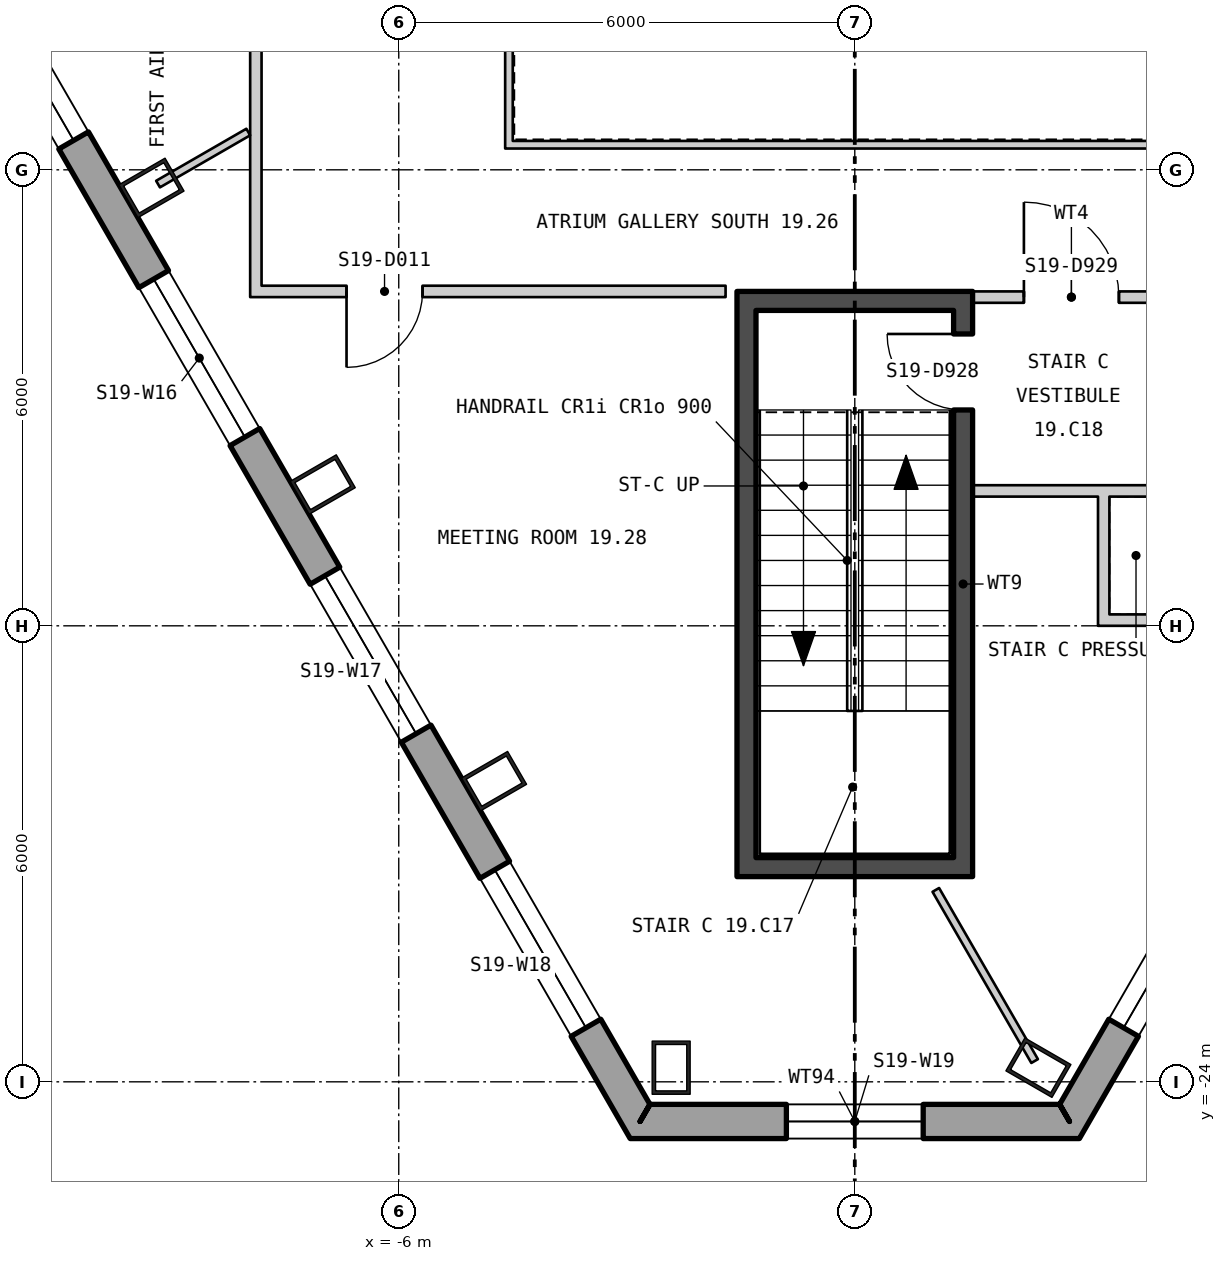
"""IFC4 building model, lengths in metres.
Left out: names, types, materials, properties, quantities, classifications, styles, units other than length and angle.
Written with IfcOpenShell. Run it as: python <this file> out.ifc"""

import sys

from ifc_helpers import new_model, si_unit, direction, frame, frame_2d, origin, origin_2d, place, context, subcontext, project, spatial, polyline, rectangle, hollow_rectangle, outline, extrude, element, fill, save


model = new_model("IFC4")
c1 = context("Model", 3, precision=1e-05, world=origin(), true_north=direction((0.0, 1.0)))
c2 = subcontext(c1, "Body", "Model", "MODEL_VIEW")
j1 = project(units=[si_unit("LENGTHUNIT", "METRE"), si_unit("PLANEANGLEUNIT", "RADIAN")], contexts=[c1])
p1 = place(None, origin())
s1 = spatial("IfcSite", under=j1, at=p1, CompositionType="ELEMENT")
p2 = place(p1, origin())
s2 = spatial("IfcBuilding", under=s1, at=p2, CompositionType="ELEMENT")
p3 = place(p2, frame((0.0, 0.0, 257.1)))
s3 = spatial("IfcBuildingStorey", under=s2, at=p3, CompositionType="ELEMENT", Elevation=257.1)
for number, where, z_axis, x_axis in (
    (1, (-9.253, -12.238, 0.0), (0.0, 0.0, 1.0), (0.5, -0.866, 0.0)),
    (2, (-7.0, -16.141, 0.0), (0.0, 0.0, 1.0), (0.5, -0.866, 0.0)),
    (3, (-4.746, -20.044, 0.0), (0.0, 0.0, 1.0), (0.5, -0.866, 0.0)),
    (4, (-2.416, -23.814, 0.0), (0.0, 0.0, 1.0), (1.0, 0.0, 0.0)),
    (5, (2.416, -23.814, 0.0), (0.0, 0.0, 1.0), (0.5, 0.866, 0.0)),
):
    element("IfcColumn", number, at=place(p3, frame(where, z_axis=z_axis, x_axis=x_axis)), inside=s3, PredefinedType="COLUMN", context=c2, shape_type="SweptSolid", body=[
        extrude(hollow_rectangle(XDim=0.5, YDim=0.7, WallThickness=0.045, at=origin_2d()), origin(), (0.0, 0.0, 1.0), 3.9),
    ])
p4 = place(p3, frame((-25.69, 15.082, -0.18), z_axis=(0.0, 0.0, 1.0), x_axis=(0.500000141277, -0.866025322218, 0.0)))
e6 = element("IfcWall", 6, at=p4, inside=s3, PredefinedType="SOLIDWALL", context=c2, shape_type="SweptSolid", body=[
    extrude(outline(polyline([(-0.13, -0.225), (45.86, -0.225), (45.6, 0.225), (0.13, 0.225), (-0.13, -0.225)])), origin(), (0.0, 0.0, 1.0), 3.68),
])
p5 = place(p4, frame((1.424, 0.0, 1.08)))
e7 = element("IfcOpeningElement", 7, at=p5, cuts=e6, PredefinedType="OPENING", context=c2, shape_type="SweptSolid", body=[
    extrude(rectangle(XDim=2.4, YDim=2.0, at=frame_2d((1.2, 1.0))), frame((0.0, 0.235, 0.0), z_axis=(0.0, -1.0, 0.0), x_axis=(1.0, 0.0, 0.0)), (0.0, 0.0, 1.0), 0.47),
])
p6 = place(p4, frame((5.892, 0.0, 1.08)))
e8 = element("IfcOpeningElement", 8, at=p6, cuts=e6, PredefinedType="OPENING", context=c2, shape_type="SweptSolid", body=[
    extrude(rectangle(XDim=2.4, YDim=2.0, at=frame_2d((1.2, 1.0))), frame((0.0, 0.235, 0.0), z_axis=(0.0, -1.0, 0.0), x_axis=(1.0, 0.0, 0.0)), (0.0, 0.0, 1.0), 0.47),
])
p7 = place(p4, frame((10.399, 0.0, 1.08)))
e9 = element("IfcOpeningElement", 9, at=p7, cuts=e6, PredefinedType="OPENING", context=c2, shape_type="SweptSolid", body=[
    extrude(rectangle(XDim=2.4, YDim=2.0, at=frame_2d((1.2, 1.0))), frame((0.0, 0.235, 0.0), z_axis=(0.0, -1.0, 0.0), x_axis=(1.0, 0.0, 0.0)), (0.0, 0.0, 1.0), 0.47),
])
p8 = place(p4, frame((14.905, 0.0, 1.08)))
e10 = element("IfcOpeningElement", 10, at=p8, cuts=e6, PredefinedType="OPENING", context=c2, shape_type="SweptSolid", body=[
    extrude(rectangle(XDim=2.4, YDim=2.0, at=frame_2d((1.2, 1.0))), frame((0.0, 0.235, 0.0), z_axis=(0.0, -1.0, 0.0), x_axis=(1.0, 0.0, 0.0)), (0.0, 0.0, 1.0), 0.47),
])
p9 = place(p4, frame((19.412, 0.0, 1.08)))
e11 = element("IfcOpeningElement", 11, at=p9, cuts=e6, PredefinedType="OPENING", context=c2, shape_type="SweptSolid", body=[
    extrude(rectangle(XDim=2.4, YDim=2.0, at=frame_2d((1.2, 1.0))), frame((0.0, 0.235, 0.0), z_axis=(0.0, -1.0, 0.0), x_axis=(1.0, 0.0, 0.0)), (0.0, 0.0, 1.0), 0.47),
])
p10 = place(p4, frame((23.918, 0.0, 1.08)))
e12 = element("IfcOpeningElement", 12, at=p10, cuts=e6, PredefinedType="OPENING", context=c2, shape_type="SweptSolid", body=[
    extrude(rectangle(XDim=2.4, YDim=2.0, at=frame_2d((1.2, 1.0))), frame((0.0, 0.235, 0.0), z_axis=(0.0, -1.0, 0.0), x_axis=(1.0, 0.0, 0.0)), (0.0, 0.0, 1.0), 0.47),
])
p11 = place(p4, frame((28.425, 0.0, 1.08)))
e13 = element("IfcOpeningElement", 13, at=p11, cuts=e6, PredefinedType="OPENING", context=c2, shape_type="SweptSolid", body=[
    extrude(rectangle(XDim=2.4, YDim=2.0, at=frame_2d((1.2, 1.0))), frame((0.0, 0.235, 0.0), z_axis=(0.0, -1.0, 0.0), x_axis=(1.0, 0.0, 0.0)), (0.0, 0.0, 1.0), 0.47),
])
p12 = place(p4, frame((32.932, 0.0, 1.08)))
e14 = element("IfcOpeningElement", 14, at=p12, cuts=e6, PredefinedType="OPENING", context=c2, shape_type="SweptSolid", body=[
    extrude(rectangle(XDim=2.4, YDim=2.0, at=frame_2d((1.2, 1.0))), frame((0.0, 0.235, 0.0), z_axis=(0.0, -1.0, 0.0), x_axis=(1.0, 0.0, 0.0)), (0.0, 0.0, 1.0), 0.47),
])
p13 = place(p4, frame((37.438, 0.0, 1.08)))
e15 = element("IfcOpeningElement", 15, at=p13, cuts=e6, PredefinedType="OPENING", context=c2, shape_type="SweptSolid", body=[
    extrude(rectangle(XDim=2.4, YDim=2.0, at=frame_2d((1.2, 1.0))), frame((0.0, 0.235, 0.0), z_axis=(0.0, -1.0, 0.0), x_axis=(1.0, 0.0, 0.0)), (0.0, 0.0, 1.0), 0.47),
])
p14 = place(p4, frame((41.907, 0.0, 1.08)))
e16 = element("IfcOpeningElement", 16, at=p14, cuts=e6, PredefinedType="OPENING", context=c2, shape_type="SweptSolid", body=[
    extrude(rectangle(XDim=2.4, YDim=2.0, at=frame_2d((1.2, 1.0))), frame((0.0, 0.235, 0.0), z_axis=(0.0, -1.0, 0.0), x_axis=(1.0, 0.0, 0.0)), (0.0, 0.0, 1.0), 0.47),
])
p15 = place(p3, frame((-2.825, -24.522, -0.18), z_axis=(0.0, 0.0, 1.0), x_axis=(1.0, 0.0, 0.0)))
e17 = element("IfcWall", 17, at=p15, inside=s3, PredefinedType="SOLIDWALL", context=c2, shape_type="SweptSolid", body=[
    extrude(outline(polyline([(-0.13, -0.225), (5.78, -0.225), (5.52, 0.225), (0.13, 0.225), (-0.13, -0.225)])), origin(), (0.0, 0.0, 1.0), 3.68),
])
p16 = place(p15, frame((1.925, 0.0, 1.08)))
e18 = element("IfcOpeningElement", 18, at=p16, cuts=e17, PredefinedType="OPENING", context=c2, shape_type="SweptSolid", body=[
    extrude(rectangle(XDim=1.8, YDim=2.0, at=frame_2d((0.9, 1.0))), frame((0.0, 0.235, 0.0), z_axis=(0.0, -1.0, 0.0), x_axis=(1.0, 0.0, 0.0)), (0.0, 0.0, 1.0), 0.47),
])
p17 = place(p3, frame((2.825, -24.522, -0.18), z_axis=(0.0, 0.0, 1.0), x_axis=(0.500000141277, 0.866025322218, 0.0)))
e19 = element("IfcWall", 19, at=p17, inside=s3, PredefinedType="SOLIDWALL", context=c2, shape_type="SweptSolid", body=[
    extrude(outline(polyline([(-0.13, -0.225), (45.86, -0.225), (45.6, 0.225), (0.13, 0.225), (-0.13, -0.225)])), origin(), (0.0, 0.0, 1.0), 3.68),
])
p18 = place(p17, frame((1.424, 0.0, 1.08)))
e20 = element("IfcOpeningElement", 20, at=p18, cuts=e19, PredefinedType="OPENING", context=c2, shape_type="SweptSolid", body=[
    extrude(rectangle(XDim=2.4, YDim=2.0, at=frame_2d((1.2, 1.0))), frame((0.0, 0.235, 0.0), z_axis=(0.0, -1.0, 0.0), x_axis=(1.0, 0.0, 0.0)), (0.0, 0.0, 1.0), 0.47),
])
p19 = place(p17, frame((5.892, 0.0, 1.08)))
e21 = element("IfcOpeningElement", 21, at=p19, cuts=e19, PredefinedType="OPENING", context=c2, shape_type="SweptSolid", body=[
    extrude(rectangle(XDim=2.4, YDim=2.0, at=frame_2d((1.2, 1.0))), frame((0.0, 0.235, 0.0), z_axis=(0.0, -1.0, 0.0), x_axis=(1.0, 0.0, 0.0)), (0.0, 0.0, 1.0), 0.47),
])
p20 = place(p17, frame((10.399, 0.0, 1.08)))
e22 = element("IfcOpeningElement", 22, at=p20, cuts=e19, PredefinedType="OPENING", context=c2, shape_type="SweptSolid", body=[
    extrude(rectangle(XDim=2.4, YDim=2.0, at=frame_2d((1.2, 1.0))), frame((0.0, 0.235, 0.0), z_axis=(0.0, -1.0, 0.0), x_axis=(1.0, 0.0, 0.0)), (0.0, 0.0, 1.0), 0.47),
])
p21 = place(p17, frame((14.905, 0.0, 1.08)))
e23 = element("IfcOpeningElement", 23, at=p21, cuts=e19, PredefinedType="OPENING", context=c2, shape_type="SweptSolid", body=[
    extrude(rectangle(XDim=2.4, YDim=2.0, at=frame_2d((1.2, 1.0))), frame((0.0, 0.235, 0.0), z_axis=(0.0, -1.0, 0.0), x_axis=(1.0, 0.0, 0.0)), (0.0, 0.0, 1.0), 0.47),
])
p22 = place(p17, frame((19.412, 0.0, 1.08)))
e24 = element("IfcOpeningElement", 24, at=p22, cuts=e19, PredefinedType="OPENING", context=c2, shape_type="SweptSolid", body=[
    extrude(rectangle(XDim=2.4, YDim=2.0, at=frame_2d((1.2, 1.0))), frame((0.0, 0.235, 0.0), z_axis=(0.0, -1.0, 0.0), x_axis=(1.0, 0.0, 0.0)), (0.0, 0.0, 1.0), 0.47),
])
p23 = place(p17, frame((28.425, 0.0, 1.08)))
e25 = element("IfcOpeningElement", 25, at=p23, cuts=e19, PredefinedType="OPENING", context=c2, shape_type="SweptSolid", body=[
    extrude(rectangle(XDim=2.4, YDim=2.0, at=frame_2d((1.2, 1.0))), frame((0.0, 0.235, 0.0), z_axis=(0.0, -1.0, 0.0), x_axis=(1.0, 0.0, 0.0)), (0.0, 0.0, 1.0), 0.47),
])
p24 = place(p17, frame((37.438, 0.0, 1.08)))
e26 = element("IfcOpeningElement", 26, at=p24, cuts=e19, PredefinedType="OPENING", context=c2, shape_type="SweptSolid", body=[
    extrude(rectangle(XDim=2.4, YDim=2.0, at=frame_2d((1.2, 1.0))), frame((0.0, 0.235, 0.0), z_axis=(0.0, -1.0, 0.0), x_axis=(1.0, 0.0, 0.0)), (0.0, 0.0, 1.0), 0.47),
])
p25 = place(p17, frame((41.907, 0.0, 1.08)))
e27 = element("IfcOpeningElement", 27, at=p25, cuts=e19, PredefinedType="OPENING", context=c2, shape_type="SweptSolid", body=[
    extrude(rectangle(XDim=2.4, YDim=2.0, at=frame_2d((1.2, 1.0))), frame((0.0, 0.235, 0.0), z_axis=(0.0, -1.0, 0.0), x_axis=(1.0, 0.0, 0.0)), (0.0, 0.0, 1.0), 0.47),
])
p26 = place(p3, frame((-4.6, -11.67, 0.0), z_axis=(0.0, 0.0, 1.0), x_axis=(1.0, 0.0, 0.0)))
e28 = element("IfcWall", 28, at=p26, inside=s3, PredefinedType="PARTITIONING", context=c2, shape_type="SweptSolid", body=[
    extrude(rectangle(XDim=9.2, YDim=0.1, at=frame_2d((4.6, 0.0))), origin(), (0.0, 0.0, 1.0), 3.7),
])
p27 = place(p3, frame((-4.55, -3.58, 0.0), z_axis=(0.0, 0.0, 1.0), x_axis=(0.0, -1.0, 0.0)))
e29 = element("IfcWall", 29, at=p27, inside=s3, PredefinedType="PARTITIONING", context=c2, shape_type="SweptSolid", body=[
    extrude(rectangle(XDim=8.04, YDim=0.1, at=frame_2d((4.02, 0.0))), origin(), (0.0, 0.0, 1.0), 3.7),
])
p28 = place(p3, frame((-1.425, -21.05, 0.0), z_axis=(0.0, 0.0, 1.0), x_axis=(0.0, 1.0, 0.0)))
e30 = element("IfcWall", 30, at=p28, inside=s3, PredefinedType="SHEAR", context=c2, shape_type="SweptSolid", body=[
    extrude(rectangle(XDim=7.2, YDim=0.25, at=frame_2d((3.6, 0.0))), origin(), (0.0, 0.0, 1.0), 3.7),
])
p29 = place(p3, frame((1.425, -21.05, 0.0), z_axis=(0.0, 0.0, 1.0), x_axis=(0.0, 1.0, 0.0)))
e31 = element("IfcWall", 31, at=p29, inside=s3, PredefinedType="SHEAR", context=c2, shape_type="SweptSolid", body=[
    extrude(rectangle(XDim=7.2, YDim=0.25, at=frame_2d((3.6, 0.0))), origin(), (0.0, 0.0, 1.0), 3.7),
])
p30 = place(p29, frame((5.89, 0.0, 0.0)))
e32 = element("IfcOpeningElement", 32, at=p30, cuts=e31, PredefinedType="OPENING", context=c2, shape_type="SweptSolid", body=[
    extrude(rectangle(XDim=1.0, YDim=2.1, at=frame_2d((0.5, 1.05))), frame((0.0, 0.135, 0.0), z_axis=(0.0, -1.0, 0.0), x_axis=(1.0, 0.0, 0.0)), (0.0, 0.0, 1.0), 0.27),
])
for number, where, z_axis, x_axis in (
    (33, (-1.55, -21.175, 0.0), (0.0, 0.0, 1.0), (1.0, 0.0, 0.0)),
    (34, (-1.55, -13.725, 0.0), (0.0, 0.0, 1.0), (1.0, 0.0, 0.0)),
):
    element("IfcWall", number, at=place(p3, frame(where, z_axis=z_axis, x_axis=x_axis)), inside=s3, PredefinedType="SHEAR", context=c2, shape_type="SweptSolid", body=[
        extrude(rectangle(XDim=3.1, YDim=0.25, at=frame_2d((1.55, 0.0))), origin(), (0.0, 0.0, 1.0), 3.7),
    ])
p31 = place(p3, frame((1.55, -16.225, 0.0), z_axis=(0.0, 0.0, 1.0), x_axis=(1.0, 0.0, 0.0)))
e35 = element("IfcWall", 35, at=p31, inside=s3, PredefinedType="PARTITIONING", context=c2, shape_type="SweptSolid", body=[
    extrude(rectangle(XDim=2.6, YDim=0.15, at=frame_2d((1.3, 0.0))), origin(), (0.0, 0.0, 1.0), 3.7),
])
p32 = place(p3, frame((1.55, -13.675, 0.0), z_axis=(0.0, 0.0, 1.0), x_axis=(1.0, 0.0, 0.0)))
e36 = element("IfcWall", 36, at=p32, inside=s3, PredefinedType="PARTITIONING", context=c2, shape_type="SweptSolid", body=[
    extrude(rectangle(XDim=2.6, YDim=0.15, at=frame_2d((1.3, 0.0))), origin(), (0.0, 0.0, 1.0), 2.692),
])
p33 = place(p32, frame((0.675, 0.0, 0.0)))
e37 = element("IfcOpeningElement", 37, at=p33, cuts=e36, PredefinedType="OPENING", context=c2, shape_type="SweptSolid", body=[
    extrude(rectangle(XDim=1.25, YDim=2.1, at=frame_2d((0.625, 1.05))), frame((0.0, 0.085, 0.0), z_axis=(0.0, -1.0, 0.0), x_axis=(1.0, 0.0, 0.0)), (0.0, 0.0, 1.0), 0.17),
])
p34 = place(p3, frame((3.275, -18.0, 0.0), z_axis=(0.0, 0.0, 1.0), x_axis=(0.0, 1.0, 0.0)))
e38 = element("IfcWall", 38, at=p34, inside=s3, PredefinedType="PARTITIONING", context=c2, shape_type="SweptSolid", body=[
    extrude(rectangle(XDim=1.7, YDim=0.15, at=frame_2d((0.85, 0.0))), origin(), (0.0, 0.0, 1.0), 3.2),
])
p35 = place(p3, frame((3.35, -17.925, 0.0), z_axis=(0.0, 0.0, 1.0), x_axis=(1.0, 0.0, 0.0)))
e39 = element("IfcWall", 39, at=p35, inside=s3, PredefinedType="PARTITIONING", context=c2, shape_type="SweptSolid", body=[
    extrude(rectangle(XDim=0.7, YDim=0.15, at=frame_2d((0.35, 0.0))), origin(), (0.0, 0.0, 1.0), 3.7),
])
p36 = place(p3, frame((-9.167, -12.188, 0.0), z_axis=(0.0, 0.0, 1.0), x_axis=(0.866124840845, 0.499827730395, 0.0)))
e40 = element("IfcWall", 40, at=p36, inside=s3, PredefinedType="PARTITIONING", context=c2, shape_type="SweptSolid", body=[
    extrude(rectangle(XDim=1.371, YDim=0.1, at=frame_2d((0.685, 0.0))), origin(), (0.0, 0.0, 1.0), 3.7),
])
p37 = place(p3, frame((-7.88, -13.675, 0.0), z_axis=(0.0, 0.0, 1.0), x_axis=(0.0, 1.0, 0.0)))
e41 = element("IfcWall", 41, at=p37, inside=s3, PredefinedType="PARTITIONING", context=c2, shape_type="SweptSolid", body=[
    extrude(rectangle(XDim=17.675, YDim=0.15, at=frame_2d((8.838, 0.0))), origin(), (0.0, 0.0, 1.0), 3.7),
])
p38 = place(p37, frame((4.331, 0.0, 0.0)))
e42 = element("IfcOpeningElement", 42, at=p38, cuts=e41, PredefinedType="OPENING", context=c2, shape_type="SweptSolid", body=[
    extrude(rectangle(XDim=1.0, YDim=2.1, at=frame_2d((0.5, 1.05))), frame((0.0, 0.085, 0.0), z_axis=(0.0, -1.0, 0.0), x_axis=(1.0, 0.0, 0.0)), (0.0, 0.0, 1.0), 0.17),
])
p39 = place(p37, frame((7.633, 0.0, 0.0)))
e43 = element("IfcOpeningElement", 43, at=p39, cuts=e41, PredefinedType="OPENING", context=c2, shape_type="SweptSolid", body=[
    extrude(rectangle(XDim=1.0, YDim=2.1, at=frame_2d((0.5, 1.05))), frame((0.0, 0.085, 0.0), z_axis=(0.0, -1.0, 0.0), x_axis=(1.0, 0.0, 0.0)), (0.0, 0.0, 1.0), 0.17),
])
p40 = place(p37, frame((16.275, 0.0, 0.0)))
e44 = element("IfcOpeningElement", 44, at=p40, cuts=e41, PredefinedType="OPENING", context=c2, shape_type="SweptSolid", body=[
    extrude(rectangle(XDim=1.0, YDim=2.1, at=frame_2d((0.5, 1.05))), frame((0.0, 0.085, 0.0), z_axis=(0.0, -1.0, 0.0), x_axis=(1.0, 0.0, 0.0)), (0.0, 0.0, 1.0), 0.17),
])
p41 = place(p3, frame((-7.805, -13.6, 0.0), z_axis=(0.0, 0.0, 1.0), x_axis=(1.0, 0.0, 0.0)))
e45 = element("IfcWall", 45, at=p41, inside=s3, PredefinedType="PARTITIONING", context=c2, shape_type="SweptSolid", body=[
    extrude(rectangle(XDim=6.105, YDim=0.15, at=frame_2d((3.053, 0.0))), origin(), (0.0, 0.0, 1.0), 2.692),
])
p42 = place(p41, frame((1.118, 0.0, 0.0)))
e46 = element("IfcOpeningElement", 46, at=p42, cuts=e45, PredefinedType="OPENING", context=c2, shape_type="SweptSolid", body=[
    extrude(rectangle(XDim=1.0, YDim=2.1, at=frame_2d((0.5, 1.05))), frame((0.0, 0.085, 0.0), z_axis=(0.0, -1.0, 0.0), x_axis=(1.0, 0.0, 0.0)), (0.0, 0.0, 1.0), 0.17),
])
p43 = place(p3, frame((1.066, -21.475, 0.0), z_axis=(0.0, 0.0, 1.0), x_axis=(0.499944387978, -0.86605750902, 0.0)))
e47 = element("IfcWall", 47, at=p43, inside=s3, PredefinedType="PARTITIONING", context=c2, shape_type="SweptSolid", body=[
    extrude(rectangle(XDim=2.6, YDim=0.1, at=frame_2d((1.3, 0.0))), origin(), (0.0, 0.0, 1.0), 3.7),
])
p44 = place(p11, origin())
e48 = element("IfcWindow", 48, at=p44, inside=s3, PartitioningType="SINGLE_PANEL", PredefinedType="WINDOW", context=c2, shape_type="SweptSolid", body=[
    extrude(rectangle(XDim=2.4, YDim=2.0, at=frame_2d((1.2, 1.0))), frame((0.0, 0.105, 0.0), z_axis=(0.0, -1.0, 0.0), x_axis=(1.0, 0.0, 0.0)), (0.0, 0.0, 1.0), 0.06),
])
fill(e13, e48)
p45 = place(p12, origin())
e49 = element("IfcWindow", 49, at=p45, inside=s3, PartitioningType="SINGLE_PANEL", PredefinedType="WINDOW", context=c2, shape_type="SweptSolid", body=[
    extrude(rectangle(XDim=2.4, YDim=2.0, at=frame_2d((1.2, 1.0))), frame((0.0, 0.105, 0.0), z_axis=(0.0, -1.0, 0.0), x_axis=(1.0, 0.0, 0.0)), (0.0, 0.0, 1.0), 0.06),
])
fill(e14, e49)
p46 = place(p13, origin())
e50 = element("IfcWindow", 50, at=p46, inside=s3, PartitioningType="SINGLE_PANEL", PredefinedType="WINDOW", context=c2, shape_type="SweptSolid", body=[
    extrude(rectangle(XDim=2.4, YDim=2.0, at=frame_2d((1.2, 1.0))), frame((0.0, 0.105, 0.0), z_axis=(0.0, -1.0, 0.0), x_axis=(1.0, 0.0, 0.0)), (0.0, 0.0, 1.0), 0.06),
])
fill(e15, e50)
p47 = place(p14, origin())
e51 = element("IfcWindow", 51, at=p47, inside=s3, PartitioningType="SINGLE_PANEL", PredefinedType="WINDOW", context=c2, shape_type="SweptSolid", body=[
    extrude(rectangle(XDim=2.4, YDim=2.0, at=frame_2d((1.2, 1.0))), frame((0.0, 0.105, 0.0), z_axis=(0.0, -1.0, 0.0), x_axis=(1.0, 0.0, 0.0)), (0.0, 0.0, 1.0), 0.06),
])
fill(e16, e51)
p48 = place(p16, origin())
e52 = element("IfcWindow", 52, at=p48, inside=s3, PartitioningType="SINGLE_PANEL", PredefinedType="WINDOW", context=c2, shape_type="SweptSolid", body=[
    extrude(rectangle(XDim=1.8, YDim=2.0, at=frame_2d((0.9, 1.0))), frame((0.0, 0.105, 0.0), z_axis=(0.0, -1.0, 0.0), x_axis=(1.0, 0.0, 0.0)), (0.0, 0.0, 1.0), 0.06),
])
fill(e18, e52)
p49 = place(p18, origin())
e53 = element("IfcWindow", 53, at=p49, inside=s3, PartitioningType="SINGLE_PANEL", PredefinedType="WINDOW", context=c2, shape_type="SweptSolid", body=[
    extrude(rectangle(XDim=2.4, YDim=2.0, at=frame_2d((1.2, 1.0))), frame((0.0, 0.105, 0.0), z_axis=(0.0, -1.0, 0.0), x_axis=(1.0, 0.0, 0.0)), (0.0, 0.0, 1.0), 0.06),
])
fill(e20, e53)
p50 = place(p30, origin())
e54 = element("IfcDoor", 54, at=p50, inside=s3, OperationType="SINGLE_SWING_LEFT", PredefinedType="DOOR", context=c2, shape_type="SweptSolid", body=[
    extrude(rectangle(XDim=1.0, YDim=2.1, at=frame_2d((0.5, 1.05))), frame((0.0, 0.025, 0.0), z_axis=(0.0, -1.0, 0.0), x_axis=(1.0, 0.0, 0.0)), (0.0, 0.0, 1.0), 0.05),
])
fill(e32, e54)
p51 = place(p33, origin())
e55 = element("IfcDoor", 55, at=p51, inside=s3, OperationType="SINGLE_SWING_RIGHT", PredefinedType="DOOR", context=c2, shape_type="SweptSolid", body=[
    extrude(rectangle(XDim=1.25, YDim=2.1, at=frame_2d((0.625, 1.05))), frame((0.0, 0.025, 0.0), z_axis=(0.0, -1.0, 0.0), x_axis=(1.0, 0.0, 0.0)), (0.0, 0.0, 1.0), 0.05),
])
fill(e37, e55)
p52 = place(p42, origin())
e56 = element("IfcDoor", 56, at=p52, inside=s3, OperationType="SINGLE_SWING_LEFT", PredefinedType="DOOR", context=c2, shape_type="SweptSolid", body=[
    extrude(rectangle(XDim=1.0, YDim=2.1, at=frame_2d((0.5, 1.05))), frame((0.0, 0.025, 0.0), z_axis=(0.0, -1.0, 0.0), x_axis=(1.0, 0.0, 0.0)), (0.0, 0.0, 1.0), 0.05),
])
fill(e46, e56)
save(model, sys.argv[1])
